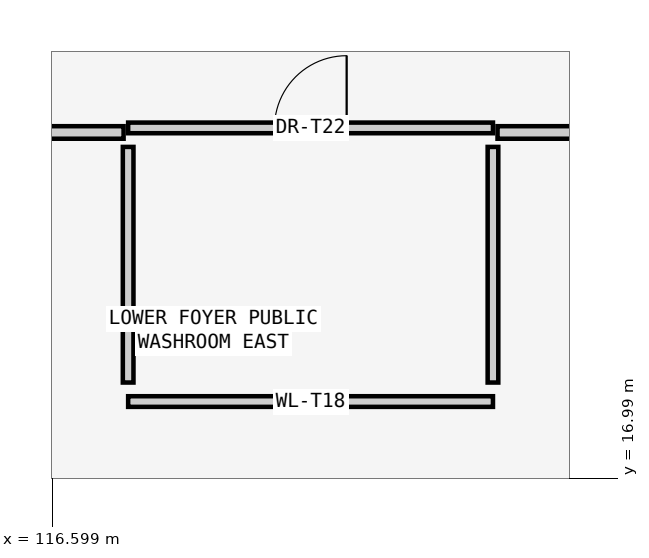
"""IFC4 building model, lengths in metres.
Left out: names, types, materials, properties, quantities, classifications, styles, units other than length and angle.
Written with IfcOpenShell. Run it as: python <this file> out.ifc"""

import sys

from ifc_helpers import new_model, si_unit, direction, frame, frame_2d, origin, place, context, subcontext, project, spatial, rectangle, extrude, element, fill, save


model = new_model("IFC4")
c1 = context("Model", 3, precision=1e-05, world=origin(), true_north=direction((0.0, 1.0)))
c2 = subcontext(c1, "Body", "Model", "MODEL_VIEW")
j1 = project(units=[si_unit("LENGTHUNIT", "METRE"), si_unit("PLANEANGLEUNIT", "RADIAN")], contexts=[c1])
p1 = place(None, origin())
s1 = spatial("IfcSite", under=j1, at=p1, CompositionType="ELEMENT")
p2 = place(p1, origin())
s2 = spatial("IfcBuilding", under=s1, at=p2, CompositionType="ELEMENT")
p3 = place(p2, frame((0.0, 0.0, -4.8)))
s3 = spatial("IfcBuildingStorey", under=s2, at=p3, CompositionType="ELEMENT", Elevation=-4.8)
p4 = place(p3, frame((117.6, 18.0, 0.0), z_axis=(0.0, 0.0, 1.0), x_axis=(1.0, 0.0, 0.0)))
e1 = element("IfcWall", 1, at=p4, inside=s3, PredefinedType="PARTITIONING", context=c2, shape_type="SweptSolid", body=[
    extrude(rectangle(XDim=4.8, YDim=0.14, at=frame_2d((2.4, 0.0))), origin(), (0.0, 0.0, 1.0), 4.32),
])
p5 = place(p3, frame((117.6, 21.6, 0.0), z_axis=(0.0, 0.0, 1.0), x_axis=(1.0, 0.0, 0.0)))
e2 = element("IfcWall", 2, at=p5, inside=s3, PredefinedType="PARTITIONING", context=c2, shape_type="SweptSolid", body=[
    extrude(rectangle(XDim=4.8, YDim=0.14, at=frame_2d((2.4, 0.0))), origin(), (0.0, 0.0, 1.0), 4.32),
])
p6 = place(p5, frame((1.925, 0.0, 0.0)))
e3 = element("IfcOpeningElement", 3, at=p6, cuts=e2, PredefinedType="OPENING", context=c2, shape_type="SweptSolid", body=[
    extrude(rectangle(XDim=0.95, YDim=2.15, at=frame_2d((0.475, 1.075))), frame((0.0, 0.08, 0.0), z_axis=(0.0, -1.0, 0.0), x_axis=(1.0, 0.0, 0.0)), (0.0, 0.0, 1.0), 0.16),
])
for number, where, z_axis, x_axis in (
    (4, (117.6, 18.25, 0.0), (0.0, 0.0, 1.0), (0.0, 1.0, 0.0)),
    (5, (122.4, 18.25, 0.0), (0.0, 0.0, 1.0), (0.0, 1.0, 0.0)),
):
    element("IfcWall", number, at=place(p3, frame(where, z_axis=z_axis, x_axis=x_axis)), inside=s3, PredefinedType="PARTITIONING", context=c2, shape_type="SweptSolid", body=[
        extrude(rectangle(XDim=3.1, YDim=0.14, at=frame_2d((1.55, 0.0))), origin(), (0.0, 0.0, 1.0), 4.32),
    ])
p7 = place(p3, frame((122.46, 21.54, 0.0), z_axis=(0.0, 0.0, 1.0), x_axis=(1.0, 0.0, 0.0)))
e6 = element("IfcWall", 6, at=p7, inside=s3, PredefinedType="PARTITIONING", context=c2, shape_type="SweptSolid", body=[
    extrude(rectangle(XDim=12.34, YDim=0.165, at=frame_2d((6.17, 0.0))), origin(), (0.0, 0.0, 1.0), 4.33),
])
p8 = place(p3, frame((109.4, 21.54, 0.0), z_axis=(0.0, 0.0, 1.0), x_axis=(1.0, 0.0, 0.0)))
e7 = element("IfcWall", 7, at=p8, inside=s3, PredefinedType="PARTITIONING", context=c2, shape_type="SweptSolid", body=[
    extrude(rectangle(XDim=8.14, YDim=0.165, at=frame_2d((4.07, 0.0))), origin(), (0.0, 0.0, 1.0), 4.33),
])
p9 = place(p6, origin())
e8 = element("IfcDoor", 8, at=p9, inside=s3, OperationType="SINGLE_SWING_RIGHT", PredefinedType="DOOR", context=c2, shape_type="SweptSolid", body=[
    extrude(rectangle(XDim=0.95, YDim=2.15, at=frame_2d((0.475, 1.075))), frame((0.0, 0.025, 0.0), z_axis=(0.0, -1.0, 0.0), x_axis=(1.0, 0.0, 0.0)), (0.0, 0.0, 1.0), 0.05),
])
fill(e3, e8)
save(model, sys.argv[1])
